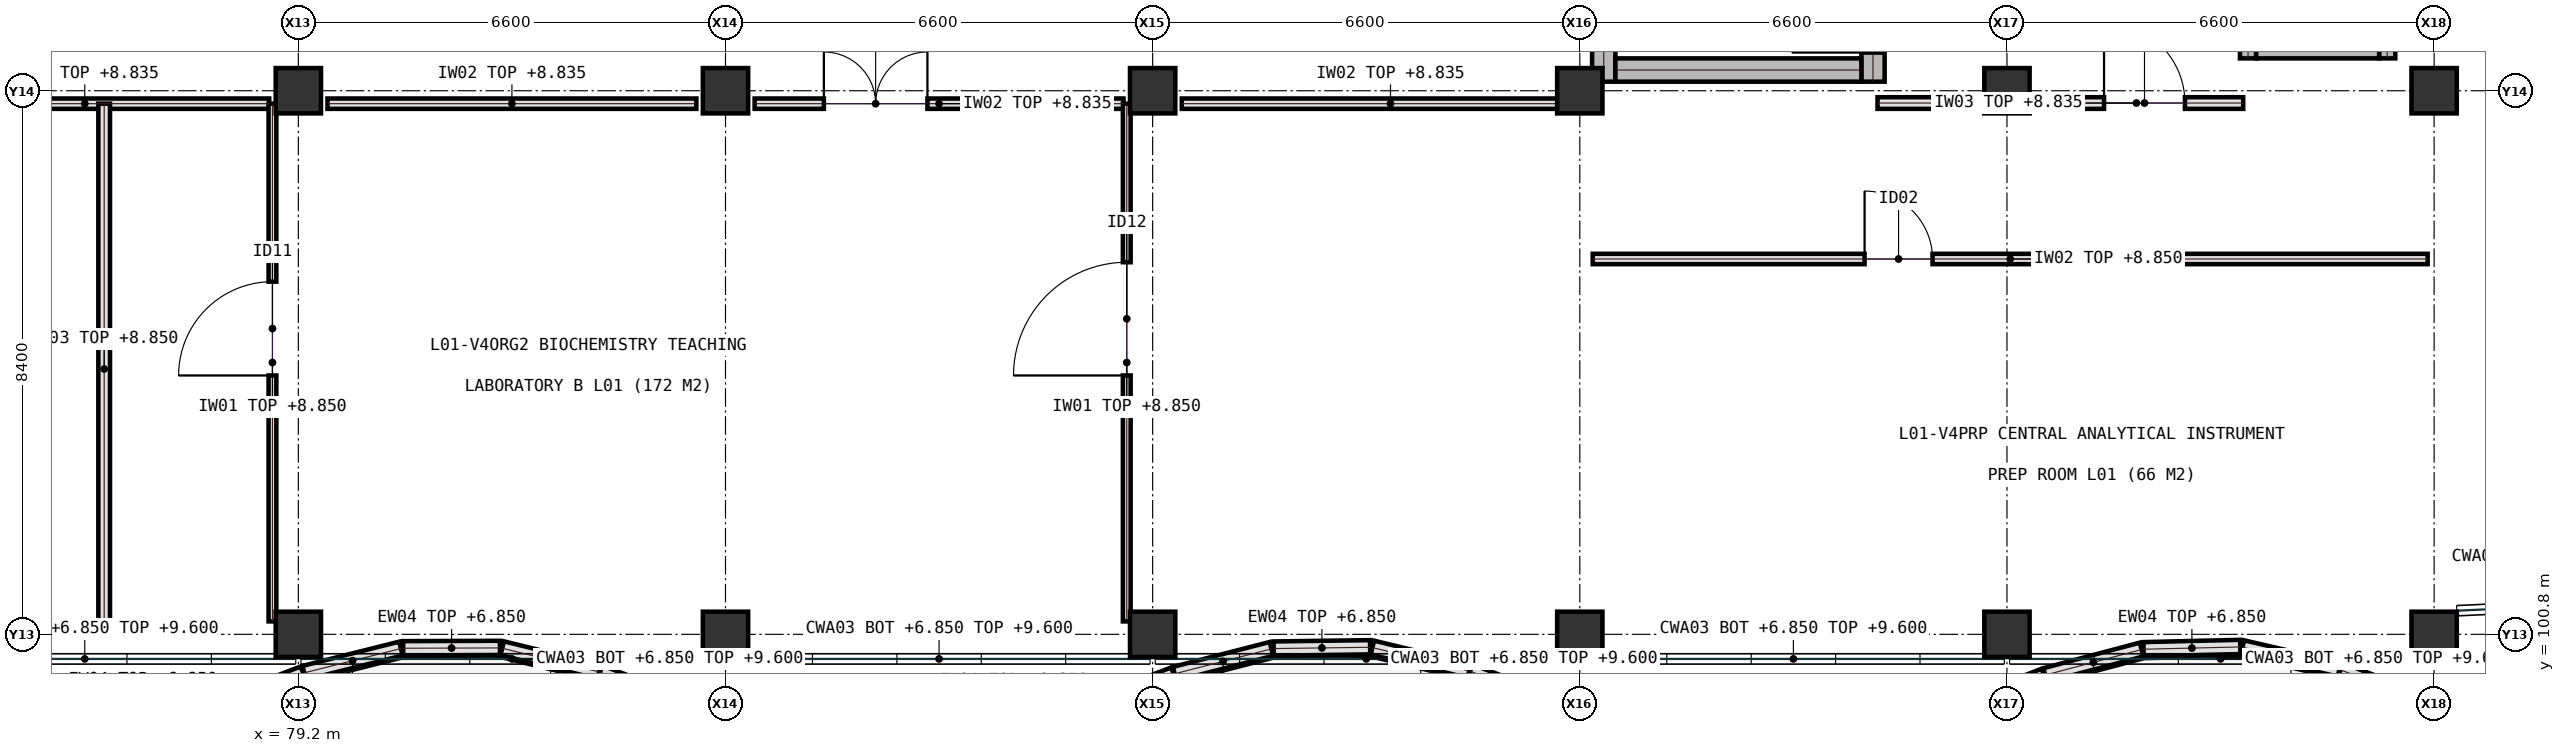
"""IFC4 building model, lengths in metres.
Left out: names, types, materials, properties, quantities, classifications, styles, units other than length and angle.
Written with IfcOpenShell. Run it as: python <this file> out.ifc"""

import sys

from ifc_helpers import new_model, si_unit, direction, frame, frame_2d, origin, origin_2d, place, context, subcontext, project, spatial, rectangle, extrude, element, fill, save


model = new_model("IFC4")
c1 = context("Model", 3, precision=1e-05, world=origin(), true_north=direction((0.0, 1.0)))
c2 = subcontext(c1, "Body", "Model", "MODEL_VIEW")
j1 = project(units=[si_unit("LENGTHUNIT", "METRE"), si_unit("PLANEANGLEUNIT", "RADIAN")], contexts=[c1])
p1 = place(None, origin())
s1 = spatial("IfcSite", under=j1, at=p1, CompositionType="ELEMENT")
p2 = place(p1, origin())
s2 = spatial("IfcBuilding", under=s1, at=p2, CompositionType="ELEMENT")
p3 = place(p2, frame((0.0, 0.0, 5.4)))
s3 = spatial("IfcBuildingStorey", under=s2, at=p3, CompositionType="ELEMENT", Elevation=5.4)
for number, where, z_axis, x_axis in (
    (1, (79.2, 100.8, 0.0), (0.0, 0.0, 1.0), (1.0, 0.0, 0.0)),
    (2, (79.2, 109.2, 0.0), (0.0, 0.0, 1.0), (1.0, 0.0, 0.0)),
    (3, (85.8, 100.8, 0.0), (0.0, 0.0, 1.0), (1.0, 0.0, 0.0)),
    (4, (85.8, 109.2, 0.0), (0.0, 0.0, 1.0), (1.0, 0.0, 0.0)),
    (5, (92.4, 100.8, 0.0), (0.0, 0.0, 1.0), (1.0, 0.0, 0.0)),
    (6, (92.4, 109.2, 0.0), (0.0, 0.0, 1.0), (1.0, 0.0, 0.0)),
    (7, (99.0, 100.8, 0.0), (0.0, 0.0, 1.0), (1.0, 0.0, 0.0)),
    (8, (99.0, 109.2, 0.0), (0.0, 0.0, 1.0), (1.0, 0.0, 0.0)),
    (9, (105.6, 100.8, 0.0), (0.0, 0.0, 1.0), (1.0, 0.0, 0.0)),
    (10, (105.6, 109.2, 0.0), (0.0, 0.0, 1.0), (1.0, 0.0, 0.0)),
    (11, (112.2, 100.8, 0.0), (0.0, 0.0, 1.0), (1.0, 0.0, 0.0)),
    (12, (112.2, 109.2, 0.0), (0.0, 0.0, 1.0), (1.0, 0.0, 0.0)),
):
    element("IfcColumn", number, at=place(p3, frame(where, z_axis=z_axis, x_axis=x_axis)), inside=s3, PredefinedType="COLUMN", context=c2, shape_type="SweptSolid", body=[
        extrude(rectangle(XDim=0.7, YDim=0.7, at=origin_2d()), origin(), (0.0, 0.0, 1.0), 4.5),
    ])
p4 = place(p3, frame((73.05, 109.0, 0.0), z_axis=(0.0, 0.0, 1.0), x_axis=(1.0, 0.0, 0.0)))
e13 = element("IfcWall", 13, at=p4, inside=s3, PredefinedType="PARTITIONING", context=c2, shape_type="SweptSolid", body=[
    extrude(rectangle(XDim=5.7, YDim=0.16, at=frame_2d((2.85, 0.0))), origin(), (0.0, 0.0, 1.0), 3.435),
])
p5 = place(p3, frame((79.65, 109.0, 0.0), z_axis=(0.0, 0.0, 1.0), x_axis=(1.0, 0.0, 0.0)))
e14 = element("IfcWall", 14, at=p5, inside=s3, PredefinedType="PARTITIONING", context=c2, shape_type="SweptSolid", body=[
    extrude(rectangle(XDim=5.7, YDim=0.16, at=frame_2d((2.85, 0.0))), origin(), (0.0, 0.0, 1.0), 3.435),
])
p6 = place(p3, frame((86.25, 109.0, 0.0), z_axis=(0.0, 0.0, 1.0), x_axis=(1.0, 0.0, 0.0)))
e15 = element("IfcWall", 15, at=p6, inside=s3, PredefinedType="PARTITIONING", context=c2, shape_type="SweptSolid", body=[
    extrude(rectangle(XDim=5.7, YDim=0.16, at=frame_2d((2.85, 0.0))), origin(), (0.0, 0.0, 1.0), 3.435),
])
p7 = place(p6, frame((1.07, 0.0, 0.0)))
e16 = element("IfcOpeningElement", 16, at=p7, cuts=e15, PredefinedType="OPENING", context=c2, shape_type="SweptSolid", body=[
    extrude(rectangle(XDim=1.6, YDim=2.2, at=frame_2d((0.8, 1.1))), frame((0.0, 0.09, 0.0), z_axis=(0.0, -1.0, 0.0), x_axis=(1.0, 0.0, 0.0)), (0.0, 0.0, 1.0), 0.18),
])
p8 = place(p3, frame((92.85, 109.0, 0.0), z_axis=(0.0, 0.0, 1.0), x_axis=(1.0, 0.0, 0.0)))
e17 = element("IfcWall", 17, at=p8, inside=s3, PredefinedType="PARTITIONING", context=c2, shape_type="SweptSolid", body=[
    extrude(rectangle(XDim=6.45, YDim=0.16, at=frame_2d((3.225, 0.0))), origin(), (0.0, 0.0, 1.0), 3.435),
])
p9 = place(p3, frame((76.2, 100.8, 0.0), z_axis=(0.0, 0.0, 1.0), x_axis=(0.0, 1.0, 0.0)))
e18 = element("IfcWall", 18, at=p9, inside=s3, PredefinedType="SOLIDWALL", context=c2, shape_type="SweptSolid", body=[
    extrude(rectangle(XDim=8.2, YDim=0.18, at=frame_2d((4.1, 0.0))), origin(), (0.0, 0.0, 1.0), 3.45),
])
p10 = place(p3, frame((78.8, 101.0, 0.0), z_axis=(0.0, 0.0, 1.0), x_axis=(0.0, 1.0, 0.0)))
e19 = element("IfcWall", 19, at=p10, inside=s3, PredefinedType="PARTITIONING", context=c2, shape_type="SweptSolid", body=[
    extrude(rectangle(XDim=8.0, YDim=0.12, at=frame_2d((4.0, 0.0))), origin(), (0.0, 0.0, 1.0), 3.45),
])
p11 = place(p10, frame((3.8, 0.0, 0.0)))
e20 = element("IfcOpeningElement", 20, at=p11, cuts=e19, PredefinedType="OPENING", context=c2, shape_type="SweptSolid", body=[
    extrude(rectangle(XDim=1.45, YDim=2.25, at=frame_2d((0.725, 1.125))), frame((0.0, 0.07, 0.0), z_axis=(0.0, -1.0, 0.0), x_axis=(1.0, 0.0, 0.0)), (0.0, 0.0, 1.0), 0.14),
])
p12 = place(p3, frame((92.0, 101.0, 0.0), z_axis=(0.0, 0.0, 1.0), x_axis=(0.0, 1.0, 0.0)))
e21 = element("IfcWall", 21, at=p12, inside=s3, PredefinedType="PARTITIONING", context=c2, shape_type="SweptSolid", body=[
    extrude(rectangle(XDim=8.0, YDim=0.12, at=frame_2d((4.0, 0.0))), origin(), (0.0, 0.0, 1.0), 3.45),
])
p13 = place(p12, frame((3.8, 0.0, 0.0)))
e22 = element("IfcOpeningElement", 22, at=p13, cuts=e21, PredefinedType="OPENING", context=c2, shape_type="SweptSolid", body=[
    extrude(rectangle(XDim=1.75, YDim=2.3, at=frame_2d((0.875, 1.15))), frame((0.0, 0.07, 0.0), z_axis=(0.0, -1.0, 0.0), x_axis=(1.0, 0.0, 0.0)), (0.0, 0.0, 1.0), 0.14),
])
p14 = place(p3, frame((99.2, 106.6, 0.0), z_axis=(0.0, 0.0, 1.0), x_axis=(1.0, 0.0, 0.0)))
e23 = element("IfcWall", 23, at=p14, inside=s3, PredefinedType="PARTITIONING", context=c2, shape_type="SweptSolid", body=[
    extrude(rectangle(XDim=12.9, YDim=0.16, at=frame_2d((6.45, 0.0))), origin(), (0.0, 0.0, 1.0), 3.45),
])
p15 = place(p14, frame((4.2, 0.0, 0.0)))
e24 = element("IfcOpeningElement", 24, at=p15, cuts=e23, PredefinedType="OPENING", context=c2, shape_type="SweptSolid", body=[
    extrude(rectangle(XDim=1.05, YDim=2.15, at=frame_2d((0.525, 1.075))), frame((0.0, 0.09, 0.0), z_axis=(0.0, -1.0, 0.0), x_axis=(1.0, 0.0, 0.0)), (0.0, 0.0, 1.0), 0.18),
])
p16 = place(p3, frame((77.78, 99.63, 0.0), z_axis=(0.0, 0.0, 1.0), x_axis=(0.93436439089, 0.356318937241, 0.0)))
e25 = element("IfcWall", 25, at=p16, inside=s3, PredefinedType="SOLIDWALL", context=c2, shape_type="SweptSolid", body=[
    extrude(rectangle(XDim=1.6, YDim=0.22, at=frame_2d((0.8, 0.0))), origin(), (0.0, 0.0, 1.0), 1.45),
])
p17 = place(p3, frame((79.29, 100.205, 0.0), z_axis=(0.0, 0.0, 1.0), x_axis=(0.969946501023, 0.243318279531, 0.0)))
e26 = element("IfcWall", 26, at=p17, inside=s3, PredefinedType="SOLIDWALL", context=c2, shape_type="SweptSolid", body=[
    extrude(rectangle(XDim=1.541, YDim=0.22, at=frame_2d((0.771, 0.0))), origin(), (0.0, 0.0, 1.0), 1.45),
])
p18 = place(p3, frame((80.82, 100.585, 0.0), z_axis=(0.0, 0.0, 1.0), x_axis=(0.999994118661, 0.003429671157, 0.0)))
e27 = element("IfcWall", 27, at=p18, inside=s3, PredefinedType="SOLIDWALL", context=c2, shape_type="SweptSolid", body=[
    extrude(rectangle(XDim=1.495, YDim=0.22, at=frame_2d((0.748, 0.0))), origin(), (0.0, 0.0, 1.0), 1.45),
])
p19 = place(p3, frame((82.35, 100.585, 0.0), z_axis=(0.0, 0.0, 1.0), x_axis=(0.971462405428, -0.237193580943, 0.0)))
e28 = element("IfcWall", 28, at=p19, inside=s3, PredefinedType="SOLIDWALL", context=c2, shape_type="SweptSolid", body=[
    extrude(rectangle(XDim=1.539, YDim=0.22, at=frame_2d((0.77, 0.0))), origin(), (0.0, 0.0, 1.0), 1.45),
])
p20 = place(p3, frame((83.86, 100.215, 0.0), z_axis=(0.0, 0.0, 1.0), x_axis=(0.933975237915, -0.35733773235, 0.0)))
e29 = element("IfcWall", 29, at=p20, inside=s3, PredefinedType="SOLIDWALL", context=c2, shape_type="SweptSolid", body=[
    extrude(rectangle(XDim=1.595, YDim=0.22, at=frame_2d((0.798, 0.0))), origin(), (0.0, 0.0, 1.0), 1.45),
])
p21 = place(p3, frame((91.23, 99.61, 0.0), z_axis=(0.0, 0.0, 1.0), x_axis=(0.933365245405, 0.358928013215, 0.0)))
e30 = element("IfcWall", 30, at=p21, inside=s3, PredefinedType="SOLIDWALL", context=c2, shape_type="SweptSolid", body=[
    extrude(rectangle(XDim=1.602, YDim=0.22, at=frame_2d((0.801, 0.0))), origin(), (0.0, 0.0, 1.0), 1.45),
])
p22 = place(p3, frame((92.74, 100.19, 0.0), z_axis=(0.0, 0.0, 1.0), x_axis=(0.968406785453, 0.249375816567, 0.0)))
e31 = element("IfcWall", 31, at=p22, inside=s3, PredefinedType="SOLIDWALL", context=c2, shape_type="SweptSolid", body=[
    extrude(rectangle(XDim=1.544, YDim=0.22, at=frame_2d((0.772, 0.0))), origin(), (0.0, 0.0, 1.0), 1.45),
])
p23 = place(p3, frame((94.27, 100.58, 0.0), z_axis=(0.0, 0.0, 1.0), x_axis=(0.999909748969, 0.01343480246, 0.0)))
e32 = element("IfcWall", 32, at=p23, inside=s3, PredefinedType="SOLIDWALL", context=c2, shape_type="SweptSolid", body=[
    extrude(rectangle(XDim=1.49, YDim=0.22, at=frame_2d((0.745, 0.0))), origin(), (0.0, 0.0, 1.0), 1.45),
])
p24 = place(p3, frame((95.795, 100.595, 0.0), z_axis=(0.0, 0.0, 1.0), x_axis=(0.972234340088, -0.234009375782, 0.0)))
e33 = element("IfcWall", 33, at=p24, inside=s3, PredefinedType="SOLIDWALL", context=c2, shape_type="SweptSolid", body=[
    extrude(rectangle(XDim=1.538, YDim=0.22, at=frame_2d((0.769, 0.0))), origin(), (0.0, 0.0, 1.0), 1.45),
])
p25 = place(p3, frame((97.305, 100.23, 0.0), z_axis=(0.0, 0.0, 1.0), x_axis=(0.935447403013, -0.353465919427, 0.0)))
e34 = element("IfcWall", 34, at=p25, inside=s3, PredefinedType="SOLIDWALL", context=c2, shape_type="SweptSolid", body=[
    extrude(rectangle(XDim=1.598, YDim=0.22, at=frame_2d((0.799, 0.0))), origin(), (0.0, 0.0, 1.0), 1.45),
])
p26 = place(p3, frame((104.68, 99.59, 0.0), z_axis=(0.0, 0.0, 1.0), x_axis=(0.933365245405, 0.358928013215, 0.0)))
e35 = element("IfcWall", 35, at=p26, inside=s3, PredefinedType="SOLIDWALL", context=c2, shape_type="SweptSolid", body=[
    extrude(rectangle(XDim=1.602, YDim=0.22, at=frame_2d((0.801, 0.0))), origin(), (0.0, 0.0, 1.0), 1.45),
])
p27 = place(p3, frame((106.19, 100.17, 0.0), z_axis=(0.0, 0.0, 1.0), x_axis=(0.966607208407, 0.256262569753, 0.0)))
e36 = element("IfcWall", 36, at=p27, inside=s3, PredefinedType="SOLIDWALL", context=c2, shape_type="SweptSolid", body=[
    extrude(rectangle(XDim=1.542, YDim=0.22, at=frame_2d((0.771, 0.0))), origin(), (0.0, 0.0, 1.0), 1.45),
])
p28 = place(p3, frame((107.71, 100.57, 0.0), z_axis=(0.0, 0.0, 1.0), x_axis=(0.99972748265, 0.023344387658, 0.0)))
e37 = element("IfcWall", 37, at=p28, inside=s3, PredefinedType="SOLIDWALL", context=c2, shape_type="SweptSolid", body=[
    extrude(rectangle(XDim=1.496, YDim=0.22, at=frame_2d((0.748, 0.0))), origin(), (0.0, 0.0, 1.0), 1.45),
])
p29 = place(p3, frame((109.24, 100.6, 0.0), z_axis=(0.0, 0.0, 1.0), x_axis=(0.974364373169, -0.224975706019, 0.0)))
e38 = element("IfcWall", 38, at=p29, inside=s3, PredefinedType="SOLIDWALL", context=c2, shape_type="SweptSolid", body=[
    extrude(rectangle(XDim=1.534, YDim=0.22, at=frame_2d((0.767, 0.0))), origin(), (0.0, 0.0, 1.0), 1.45),
])
p30 = place(p3, frame((110.755, 100.25, 0.0), z_axis=(0.0, 0.0, 1.0), x_axis=(0.935447403013, -0.353465919427, 0.0)))
e39 = element("IfcWall", 39, at=p30, inside=s3, PredefinedType="SOLIDWALL", context=c2, shape_type="SweptSolid", body=[
    extrude(rectangle(XDim=1.598, YDim=0.22, at=frame_2d((0.799, 0.0))), origin(), (0.0, 0.0, 1.0), 1.45),
])
p31 = place(p3, frame((99.37, 109.34, 0.0), z_axis=(0.0, 0.0, 1.0), x_axis=(0.0, 1.0, 0.0)))
e40 = element("IfcWall", 40, at=p31, inside=s3, PredefinedType="SHEAR", context=c2, shape_type="SweptSolid", body=[
    extrude(rectangle(XDim=8.09, YDim=0.36, at=frame_2d((4.045, 0.0))), origin(), (0.0, 0.0, 1.0), 4.2),
])
p32 = place(p3, frame((103.53, 109.34, 0.0), z_axis=(0.0, 0.0, 1.0), x_axis=(0.0, 1.0, 0.0)))
e41 = element("IfcWall", 41, at=p32, inside=s3, PredefinedType="SHEAR", context=c2, shape_type="SweptSolid", body=[
    extrude(rectangle(XDim=8.09, YDim=0.36, at=frame_2d((4.045, 0.0))), origin(), (0.0, 0.0, 1.0), 4.2),
])
p33 = place(p32, frame((0.45, 0.0, 0.0)))
e42 = element("IfcOpeningElement", 42, at=p33, cuts=e41, PredefinedType="OPENING", context=c2, shape_type="SweptSolid", body=[
    extrude(rectangle(XDim=1.25, YDim=2.15, at=frame_2d((0.625, 1.075))), frame((0.0, 0.19, 0.0), z_axis=(0.0, -1.0, 0.0), x_axis=(1.0, 0.0, 0.0)), (0.0, 0.0, 1.0), 0.38),
])
p34 = place(p3, frame((99.55, 109.52, 0.0), z_axis=(0.0, 0.0, 1.0), x_axis=(1.0, 0.0, 0.0)))
e43 = element("IfcWall", 43, at=p34, inside=s3, PredefinedType="SHEAR", context=c2, shape_type="SweptSolid", body=[
    extrude(rectangle(XDim=3.8, YDim=0.36, at=frame_2d((1.9, 0.0))), origin(), (0.0, 0.0, 1.0), 4.2),
])
p35 = place(p3, frame((109.325, 109.7, 0.0), z_axis=(0.0, 0.0, 1.0), x_axis=(0.0, 1.0, 0.0)))
e44 = element("IfcWall", 44, at=p35, inside=s3, PredefinedType="SHEAR", context=c2, shape_type="SweptSolid", body=[
    extrude(rectangle(XDim=3.2, YDim=0.25, at=frame_2d((1.6, 0.0))), origin(), (0.0, 0.0, 1.0), 4.2),
])
p36 = place(p35, frame((1.05, 0.0, 0.0)))
e45 = element("IfcOpeningElement", 45, at=p36, cuts=e44, PredefinedType="OPENING", context=c2, shape_type="SweptSolid", body=[
    extrude(rectangle(XDim=1.1, YDim=2.15, at=frame_2d((0.55, 1.075))), frame((0.0, 0.135, 0.0), z_axis=(0.0, -1.0, 0.0), x_axis=(1.0, 0.0, 0.0)), (0.0, 0.0, 1.0), 0.27),
])
p37 = place(p3, frame((111.475, 109.7, 0.0), z_axis=(0.0, 0.0, 1.0), x_axis=(0.0, 1.0, 0.0)))
e46 = element("IfcWall", 46, at=p37, inside=s3, PredefinedType="SHEAR", context=c2, shape_type="SweptSolid", body=[
    extrude(rectangle(XDim=3.2, YDim=0.25, at=frame_2d((1.6, 0.0))), origin(), (0.0, 0.0, 1.0), 4.2),
])
p38 = place(p3, frame((109.45, 109.825, 0.0), z_axis=(0.0, 0.0, 1.0), x_axis=(1.0, 0.0, 0.0)))
e47 = element("IfcWall", 47, at=p38, inside=s3, PredefinedType="SHEAR", context=c2, shape_type="SweptSolid", body=[
    extrude(rectangle(XDim=1.9, YDim=0.25, at=frame_2d((0.95, 0.0))), origin(), (0.0, 0.0, 1.0), 4.2),
])
p39 = place(p3, frame((103.6, 109.01, 0.0), z_axis=(0.0, 0.0, 1.0), x_axis=(1.0, 0.0, 0.0)))
e48 = element("IfcWall", 48, at=p39, inside=s3, PredefinedType="SOLIDWALL", context=c2, shape_type="SweptSolid", body=[
    extrude(rectangle(XDim=1.65, YDim=0.18, at=frame_2d((0.825, 0.0))), origin(), (0.0, 0.0, 1.0), 3.435),
])
p40 = place(p3, frame((105.95, 109.01, 0.0), z_axis=(0.0, 0.0, 1.0), x_axis=(1.0, 0.0, 0.0)))
e49 = element("IfcWall", 49, at=p40, inside=s3, PredefinedType="SOLIDWALL", context=c2, shape_type="SweptSolid", body=[
    extrude(rectangle(XDim=3.3, YDim=0.18, at=frame_2d((1.65, 0.0))), origin(), (0.0, 0.0, 1.0), 3.435),
])
p41 = place(p40, frame((1.15, 0.0, 0.0)))
e50 = element("IfcOpeningElement", 50, at=p41, cuts=e49, PredefinedType="OPENING", context=c2, shape_type="SweptSolid", body=[
    extrude(rectangle(XDim=1.25, YDim=2.15, at=frame_2d((0.625, 1.075))), frame((0.0, 0.1, 0.0), z_axis=(0.0, -1.0, 0.0), x_axis=(1.0, 0.0, 0.0)), (0.0, 0.0, 1.0), 0.2),
])
p42 = place(p7, origin())
e51 = element("IfcDoor", 51, at=p42, inside=s3, OperationType="DOUBLE_DOOR_SINGLE_SWING", PredefinedType="DOOR", context=c2, shape_type="SweptSolid", body=[
    extrude(rectangle(XDim=1.6, YDim=2.2, at=frame_2d((0.8, 1.1))), frame((0.0, 0.025, 0.0), z_axis=(0.0, -1.0, 0.0), x_axis=(1.0, 0.0, 0.0)), (0.0, 0.0, 1.0), 0.05),
])
fill(e16, e51)
p43 = place(p11, origin())
e52 = element("IfcDoor", 52, at=p43, inside=s3, OperationType="SINGLE_SWING_LEFT", PredefinedType="DOOR", context=c2, shape_type="SweptSolid", body=[
    extrude(rectangle(XDim=1.45, YDim=2.25, at=frame_2d((0.725, 1.125))), frame((0.0, 0.025, 0.0), z_axis=(0.0, -1.0, 0.0), x_axis=(1.0, 0.0, 0.0)), (0.0, 0.0, 1.0), 0.05),
])
fill(e20, e52)
p44 = place(p13, origin())
e53 = element("IfcDoor", 53, at=p44, inside=s3, OperationType="SINGLE_SWING_LEFT", PredefinedType="DOOR", context=c2, shape_type="SweptSolid", body=[
    extrude(rectangle(XDim=1.75, YDim=2.3, at=frame_2d((0.875, 1.15))), frame((0.0, 0.025, 0.0), z_axis=(0.0, -1.0, 0.0), x_axis=(1.0, 0.0, 0.0)), (0.0, 0.0, 1.0), 0.05),
])
fill(e22, e53)
p45 = place(p15, origin())
e54 = element("IfcDoor", 54, at=p45, inside=s3, OperationType="SINGLE_SWING_LEFT", PredefinedType="DOOR", context=c2, shape_type="SweptSolid", body=[
    extrude(rectangle(XDim=1.05, YDim=2.15, at=frame_2d((0.525, 1.075))), frame((0.0, 0.025, 0.0), z_axis=(0.0, -1.0, 0.0), x_axis=(1.0, 0.0, 0.0)), (0.0, 0.0, 1.0), 0.05),
])
fill(e24, e54)
p46 = place(p33, origin())
e55 = element("IfcDoor", 55, at=p46, inside=s3, OperationType="SINGLE_SWING_LEFT", PredefinedType="DOOR", context=c2, shape_type="SweptSolid", body=[
    extrude(rectangle(XDim=1.25, YDim=2.15, at=frame_2d((0.625, 1.075))), frame((0.0, 0.025, 0.0), z_axis=(0.0, -1.0, 0.0), x_axis=(1.0, 0.0, 0.0)), (0.0, 0.0, 1.0), 0.05),
])
fill(e42, e55)
p47 = place(p41, origin())
e56 = element("IfcDoor", 56, at=p47, inside=s3, OperationType="SINGLE_SWING_LEFT", PredefinedType="DOOR", context=c2, shape_type="SweptSolid", body=[
    extrude(rectangle(XDim=1.25, YDim=2.15, at=frame_2d((0.625, 1.075))), frame((0.0, 0.025, 0.0), z_axis=(0.0, -1.0, 0.0), x_axis=(1.0, 0.0, 0.0)), (0.0, 0.0, 1.0), 0.05),
])
fill(e50, e56)
save(model, sys.argv[1])
